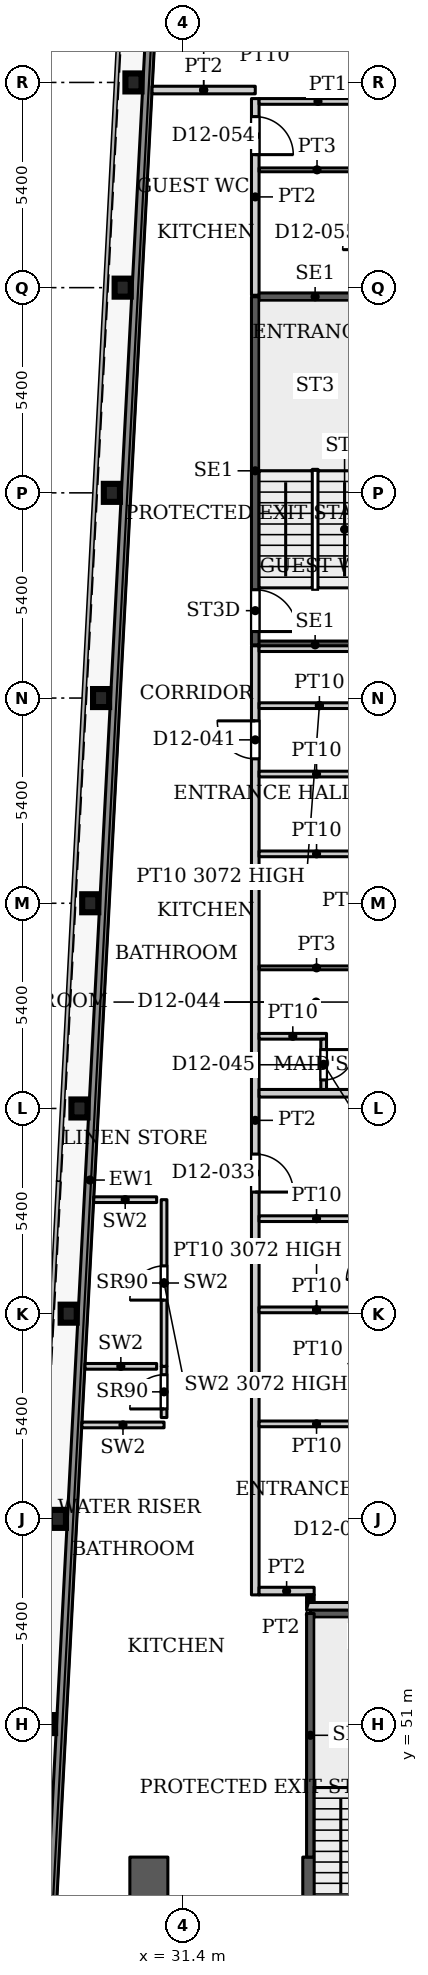
"""IFC4 building model, lengths in metres.
Left out: names, types, materials, properties, quantities, classifications, styles, units other than length and angle.
Written with IfcOpenShell. Run it as: python <this file> out.ifc"""

import sys

from ifc_helpers import new_model, si_unit, direction, frame, frame_2d, origin, origin_2d, place, context, subcontext, project, spatial, rectangle, i_section, extrude, source, transform, mapped, element, fill, save


model = new_model("IFC4")
c1 = context("Model", 3, precision=1e-05, world=origin(), true_north=direction((0.0, 1.0)))
c2 = subcontext(c1, "Body", "Model", "MODEL_VIEW")
j1 = project(units=[si_unit("LENGTHUNIT", "METRE"), si_unit("PLANEANGLEUNIT", "RADIAN")], contexts=[c1])
p1 = place(None, origin())
s1 = spatial("IfcSite", under=j1, at=p1, CompositionType="ELEMENT")
p2 = place(p1, origin())
s2 = spatial("IfcBuilding", under=s1, at=p2, CompositionType="ELEMENT")
p3 = place(p2, frame((0.0, 0.0, 53.9)))
s3 = spatial("IfcBuildingStorey", under=s2, at=p3, CompositionType="ELEMENT", Elevation=53.9)
for number, where, z_axis, x_axis in (
    (1, (27.822, 51.0, 0.0), (0.0, 0.0, 1.0), (1.0, 0.0, 0.0)),
    (2, (28.106, 56.4, 0.0), (0.0, 0.0, 1.0), (1.0, 0.0, 0.0)),
    (3, (28.39, 61.8, 0.0), (0.0, 0.0, 1.0), (1.0, 0.0, 0.0)),
    (4, (28.674, 67.2, 0.0), (0.0, 0.0, 1.0), (1.0, 0.0, 0.0)),
    (5, (28.958, 72.6, 0.0), (0.0, 0.0, 1.0), (1.0, 0.0, 0.0)),
    (6, (29.243, 78.0, 0.0), (0.0, 0.0, 1.0), (1.0, 0.0, 0.0)),
    (7, (29.527, 83.4, 0.0), (0.0, 0.0, 1.0), (1.0, 0.0, 0.0)),
    (8, (29.811, 88.8, 0.0), (0.0, 0.0, 1.0), (1.0, 0.0, 0.0)),
    (9, (30.095, 94.2, 0.0), (0.0, 0.0, 1.0), (1.0, 0.0, 0.0)),
):
    element("IfcColumn", number, at=place(p3, frame(where, z_axis=z_axis, x_axis=x_axis)), inside=s3, PredefinedType="COLUMN", context=c2, shape_type="SweptSolid", body=[
        extrude(i_section(OverallWidth=0.424, OverallDepth=0.474, WebThickness=0.048, FlangeThickness=0.077, FilletRadius=0.014, at=origin_2d()), origin(), (0.0, 0.0, 1.0), 3.9),
    ])
p4 = place(p3, frame((34.75, 29.05, 0.0), z_axis=(0.0, 0.0, 1.0), x_axis=(0.0, 1.0, 0.0)))
e10 = element("IfcWall", 10, at=p4, inside=s3, PredefinedType="SHEAR", context=c2, shape_type="SweptSolid", body=[
    extrude(rectangle(XDim=18.45, YDim=0.4, at=frame_2d((9.225, 0.0))), origin(), (0.0, 0.0, 1.0), 3.9),
])
p5 = place(p4, frame((8.025, 0.0, 0.0)))
e11 = element("IfcOpeningElement", 11, at=p5, cuts=e10, PredefinedType="OPENING", context=c2, shape_type="SweptSolid", body=[
    extrude(rectangle(XDim=1.1, YDim=2.2, at=frame_2d((0.55, 1.1))), frame((0.0, 0.21, 0.0), z_axis=(0.0, -1.0, 0.0), x_axis=(1.0, 0.0, 0.0)), (0.0, 0.0, 1.0), 0.42),
])
p6 = place(p4, frame((10.875, 0.0, 0.0)))
e12 = element("IfcOpeningElement", 12, at=p6, cuts=e10, PredefinedType="OPENING", context=c2, shape_type="SweptSolid", body=[
    extrude(rectangle(XDim=1.1, YDim=2.2, at=frame_2d((0.55, 1.1))), frame((0.0, 0.21, 0.0), z_axis=(0.0, -1.0, 0.0), x_axis=(1.0, 0.0, 0.0)), (0.0, 0.0, 1.0), 0.42),
])
p7 = place(p4, frame((13.725, 0.0, 0.0)))
e13 = element("IfcOpeningElement", 13, at=p7, cuts=e10, PredefinedType="OPENING", context=c2, shape_type="SweptSolid", body=[
    extrude(rectangle(XDim=1.1, YDim=2.2, at=frame_2d((0.55, 1.1))), frame((0.0, 0.21, 0.0), z_axis=(0.0, -1.0, 0.0), x_axis=(1.0, 0.0, 0.0)), (0.0, 0.0, 1.0), 0.42),
])
p8 = place(p4, frame((15.95, 0.0, 0.0)))
e14 = element("IfcOpeningElement", 14, at=p8, cuts=e10, PredefinedType="OPENING", context=c2, shape_type="SweptSolid", body=[
    extrude(rectangle(XDim=1.1, YDim=2.2, at=frame_2d((0.55, 1.1))), frame((0.0, 0.21, 0.0), z_axis=(0.0, -1.0, 0.0), x_axis=(1.0, 0.0, 0.0)), (0.0, 0.0, 1.0), 0.42),
])
p9 = place(p3, frame((30.5, 29.05, 0.0), z_axis=(0.0, 0.0, 1.0), x_axis=(0.0, 1.0, 0.0)))
e15 = element("IfcWall", 15, at=p9, inside=s3, PredefinedType="SHEAR", context=c2, shape_type="SweptSolid", body=[
    extrude(rectangle(XDim=18.45, YDim=1.0, at=frame_2d((9.225, 0.0))), origin(), (0.0, 0.0, 1.0), 3.9),
])
p10 = place(p9, frame((1.5, 0.0, 0.0)))
e16 = element("IfcOpeningElement", 16, at=p10, cuts=e15, PredefinedType="OPENING", context=c2, shape_type="SweptSolid", body=[
    extrude(rectangle(XDim=0.9, YDim=2.2, at=frame_2d((0.45, 1.1))), frame((0.0, 0.51, 0.0), z_axis=(0.0, -1.0, 0.0), x_axis=(1.0, 0.0, 0.0)), (0.0, 0.0, 1.0), 1.02),
])
p11 = place(p9, frame((6.03, 0.0, 0.0)))
e17 = element("IfcOpeningElement", 17, at=p11, cuts=e15, PredefinedType="OPENING", context=c2, shape_type="SweptSolid", body=[
    extrude(rectangle(XDim=0.9, YDim=2.2, at=frame_2d((0.45, 1.1))), frame((0.0, 0.51, 0.0), z_axis=(0.0, -1.0, 0.0), x_axis=(1.0, 0.0, 0.0)), (0.0, 0.0, 1.0), 1.02),
])
p12 = place(p9, frame((9.7, 0.0, 0.0)))
e18 = element("IfcOpeningElement", 18, at=p12, cuts=e15, PredefinedType="OPENING", context=c2, shape_type="SweptSolid", body=[
    extrude(rectangle(XDim=0.9, YDim=2.2, at=frame_2d((0.45, 1.1))), frame((0.0, 0.51, 0.0), z_axis=(0.0, -1.0, 0.0), x_axis=(1.0, 0.0, 0.0)), (0.0, 0.0, 1.0), 1.02),
])
p13 = place(p3, frame((27.195, 31.969, 0.0), z_axis=(0.0, 0.0, 1.0), x_axis=(0.052554995867, 0.998618031286, 0.0)))
e19 = element("IfcWall", 19, at=p13, inside=s3, PredefinedType="SOLIDWALL", context=c2, shape_type="SweptSolid", body=[
    extrude(rectangle(XDim=66.787, YDim=0.25, at=frame_2d((33.394, 0.0))), origin(), (0.0, 0.0, 1.0), 3.75),
])
p14 = place(p3, frame((34.75, 53.91, 0.0), z_axis=(0.0, 0.0, 1.0), x_axis=(1.0, 0.0, 0.0)))
e20 = element("IfcWall", 20, at=p14, inside=s3, PredefinedType="SHEAR", context=c2, shape_type="SweptSolid", body=[
    extrude(rectangle(XDim=3.15, YDim=0.2, at=frame_2d((1.575, 0.0))), origin(), (0.0, 0.0, 1.0), 3.9),
])
p15 = place(p3, frame((34.75, 47.5, 0.0), z_axis=(0.0, 0.0, 1.0), x_axis=(0.0, 1.0, 0.0)))
e21 = element("IfcWall", 21, at=p15, inside=s3, PredefinedType="SHEAR", context=c2, shape_type="SweptSolid", body=[
    extrude(rectangle(XDim=6.41, YDim=0.2, at=frame_2d((3.205, 0.0))), origin(), (0.0, 0.0, 1.0), 3.9),
])
for number, where, z_axis, x_axis in (
    (22, (33.3, 79.4, 0.0), (0.0, 0.0, 1.0), (1.0, 0.0, 0.0)),
    (23, (33.3, 88.56, 0.0), (0.0, 0.0, 1.0), (1.0, 0.0, 0.0)),
):
    element("IfcWall", number, at=place(p3, frame(where, z_axis=z_axis, x_axis=x_axis)), inside=s3, PredefinedType="SHEAR", context=c2, shape_type="SweptSolid", body=[
        extrude(rectangle(XDim=3.15, YDim=0.2, at=frame_2d((1.575, 0.0))), origin(), (0.0, 0.0, 1.0), 3.9),
    ])
p16 = place(p3, frame((33.3, 79.4, 0.0), z_axis=(0.0, 0.0, 1.0), x_axis=(0.0, 1.0, 0.0)))
e24 = element("IfcWall", 24, at=p16, inside=s3, PredefinedType="SHEAR", context=c2, shape_type="SweptSolid", body=[
    extrude(rectangle(XDim=9.16, YDim=0.2, at=frame_2d((4.58, 0.0))), origin(), (0.0, 0.0, 1.0), 3.9),
])
p17 = place(p16, frame((0.35, 0.0, 0.0)))
e25 = element("IfcOpeningElement", 25, at=p17, cuts=e24, PredefinedType="OPENING", context=c2, shape_type="SweptSolid", body=[
    extrude(rectangle(XDim=1.1, YDim=2.2, at=frame_2d((0.55, 1.1))), frame((0.0, 0.11, 0.0), z_axis=(0.0, -1.0, 0.0), x_axis=(1.0, 0.0, 0.0)), (0.0, 0.0, 1.0), 0.22),
])
p18 = place(p3, frame((28.738, 58.872, 0.0), z_axis=(0.0, 0.0, 1.0), x_axis=(1.0, 0.0, 0.0)))
e26 = element("IfcWall", 26, at=p18, inside=s3, PredefinedType="PARTITIONING", context=c2, shape_type="SweptSolid", body=[
    extrude(rectangle(XDim=2.162, YDim=0.15, at=frame_2d((1.081, 0.0))), origin(), (0.0, 0.0, 1.0), 3.9),
])
p19 = place(p3, frame((30.9, 59.067, 0.0), z_axis=(0.0, 0.0, 1.0), x_axis=(0.0, 1.0, 0.0)))
e27 = element("IfcWall", 27, at=p19, inside=s3, PredefinedType="PARTITIONING", context=c2, shape_type="SweptSolid", body=[
    extrude(rectangle(XDim=1.347, YDim=0.15, at=frame_2d((0.674, 0.0))), origin(), (0.0, 0.0, 1.0), 3.9),
])
p20 = place(p19, frame((0.226, 0.0, 0.0)))
e28 = element("IfcOpeningElement", 28, at=p20, cuts=e27, PredefinedType="OPENING", context=c2, shape_type="SweptSolid", body=[
    extrude(rectangle(XDim=0.9, YDim=2.2, at=frame_2d((0.45, 1.1))), frame((0.0, 0.085, 0.0), z_axis=(0.0, -1.0, 0.0), x_axis=(1.0, 0.0, 0.0)), (0.0, 0.0, 1.0), 0.17),
])
p21 = place(p3, frame((28.82, 60.414, 0.0), z_axis=(0.0, 0.0, 1.0), x_axis=(1.0, 0.0, 0.0)))
e29 = element("IfcWall", 29, at=p21, inside=s3, PredefinedType="PARTITIONING", context=c2, shape_type="SweptSolid", body=[
    extrude(rectangle(XDim=1.885, YDim=0.15, at=frame_2d((0.942, 0.0))), origin(), (0.0, 0.0, 1.0), 3.9),
])
p22 = place(p3, frame((30.9, 60.414, 0.0), z_axis=(0.0, 0.0, 1.0), x_axis=(0.0, 1.0, 0.0)))
e30 = element("IfcWall", 30, at=p22, inside=s3, PredefinedType="PARTITIONING", context=c2, shape_type="SweptSolid", body=[
    extrude(rectangle(XDim=4.386, YDim=0.15, at=frame_2d((2.193, 0.0))), origin(), (0.0, 0.0, 1.0), 3.072),
])
p23 = place(p22, frame((1.743, 0.0, 0.0)))
e31 = element("IfcOpeningElement", 31, at=p23, cuts=e30, PredefinedType="OPENING", context=c2, shape_type="SweptSolid", body=[
    extrude(rectangle(XDim=0.9, YDim=2.2, at=frame_2d((0.45, 1.1))), frame((0.0, 0.085, 0.0), z_axis=(0.0, -1.0, 0.0), x_axis=(1.0, 0.0, 0.0)), (0.0, 0.0, 1.0), 0.17),
])
p24 = place(p3, frame((29.05, 64.8, 0.0), z_axis=(0.0, 0.0, 1.0), x_axis=(1.0, 0.0, 0.0)))
e32 = element("IfcWall", 32, at=p24, inside=s3, PredefinedType="PARTITIONING", context=c2, shape_type="SweptSolid", body=[
    extrude(rectangle(XDim=1.655, YDim=0.15, at=frame_2d((0.828, 0.0))), origin(), (0.0, 0.0, 1.0), 3.9),
])
p25 = place(p3, frame((30.585, 94.0, 0.0), z_axis=(0.0, 0.0, 1.0), x_axis=(1.0, 0.0, 0.0)))
e33 = element("IfcWall", 33, at=p25, inside=s3, PredefinedType="PARTITIONING", context=c2, shape_type="SweptSolid", body=[
    extrude(rectangle(XDim=2.715, YDim=0.2, at=frame_2d((1.358, 0.0))), origin(), (0.0, 0.0, 1.0), 3.147),
])
p26 = place(p3, frame((33.3, 54.4, 0.0), z_axis=(0.0, 0.0, 1.0), x_axis=(0.0, 1.0, 0.0)))
e34 = element("IfcWall", 34, at=p26, inside=s3, PredefinedType="PARTITIONING", context=c2, shape_type="SweptSolid", body=[
    extrude(rectangle(XDim=24.975, YDim=0.2, at=frame_2d((12.488, 0.0))), origin(), (0.0, 0.0, 1.0), 3.6),
])
p27 = place(p26, frame((10.6, 0.0, 0.0)))
e35 = element("IfcOpeningElement", 35, at=p27, cuts=e34, PredefinedType="OPENING", context=c2, shape_type="SweptSolid", body=[
    extrude(rectangle(XDim=1.0, YDim=2.1, at=frame_2d((0.5, 1.05))), frame((0.0, 0.11, 0.0), z_axis=(0.0, -1.0, 0.0), x_axis=(1.0, 0.0, 0.0)), (0.0, 0.0, 1.0), 0.22),
])
p28 = place(p26, frame((22.0, 0.0, 0.0)))
e36 = element("IfcOpeningElement", 36, at=p28, cuts=e34, PredefinedType="OPENING", context=c2, shape_type="SweptSolid", body=[
    extrude(rectangle(XDim=1.0, YDim=2.1, at=frame_2d((0.5, 1.05))), frame((0.0, 0.11, 0.0), z_axis=(0.0, -1.0, 0.0), x_axis=(1.0, 0.0, 0.0)), (0.0, 0.0, 1.0), 0.22),
])
p29 = place(p3, frame((33.3, 88.6, 0.0), z_axis=(0.0, 0.0, 1.0), x_axis=(0.0, 1.0, 0.0)))
e37 = element("IfcWall", 37, at=p29, inside=s3, PredefinedType="PARTITIONING", context=c2, shape_type="SweptSolid", body=[
    extrude(rectangle(XDim=5.175, YDim=0.2, at=frame_2d((2.587, 0.0))), origin(), (0.0, 0.0, 1.0), 3.6),
])
p30 = place(p29, frame((3.7, 0.0, 0.0)))
e38 = element("IfcOpeningElement", 38, at=p30, cuts=e37, PredefinedType="OPENING", context=c2, shape_type="SweptSolid", body=[
    extrude(rectangle(XDim=1.0, YDim=2.1, at=frame_2d((0.5, 1.05))), frame((0.0, 0.11, 0.0), z_axis=(0.0, -1.0, 0.0), x_axis=(1.0, 0.0, 0.0)), (0.0, 0.0, 1.0), 0.22),
])
p31 = place(p3, frame((33.4, 54.5, 0.0), z_axis=(0.0, 0.0, 1.0), x_axis=(1.0, 0.0, 0.0)))
e39 = element("IfcWall", 39, at=p31, inside=s3, PredefinedType="PARTITIONING", context=c2, shape_type="SweptSolid", body=[
    extrude(rectangle(XDim=1.45, YDim=0.2, at=frame_2d((0.725, 0.0))), origin(), (0.0, 0.0, 1.0), 3.6),
])
p32 = place(p3, frame((33.4, 58.9, 0.0), z_axis=(0.0, 0.0, 1.0), x_axis=(1.0, 0.0, 0.0)))
e40 = element("IfcWall", 40, at=p32, inside=s3, PredefinedType="PARTITIONING", context=c2, shape_type="SweptSolid", body=[
    extrude(rectangle(XDim=3.025, YDim=0.15, at=frame_2d((1.513, 0.0))), origin(), (0.0, 0.0, 1.0), 3.6),
])
p33 = place(p3, frame((33.4, 61.9, 0.0), z_axis=(0.0, 0.0, 1.0), x_axis=(1.0, 0.0, 0.0)))
e41 = element("IfcWall", 41, at=p33, inside=s3, PredefinedType="PARTITIONING", context=c2, shape_type="SweptSolid", body=[
    extrude(rectangle(XDim=3.025, YDim=0.15, at=frame_2d((1.513, 0.0))), origin(), (0.0, 0.0, 1.0), 3.072),
])
p34 = place(p3, frame((33.4, 64.3, 0.0), z_axis=(0.0, 0.0, 1.0), x_axis=(1.0, 0.0, 0.0)))
e42 = element("IfcWall", 42, at=p34, inside=s3, PredefinedType="PARTITIONING", context=c2, shape_type="SweptSolid", body=[
    extrude(rectangle(XDim=3.025, YDim=0.15, at=frame_2d((1.513, 0.0))), origin(), (0.0, 0.0, 1.0), 3.6),
])
p35 = place(p3, frame((33.4, 67.6, 0.0), z_axis=(0.0, 0.0, 1.0), x_axis=(1.0, 0.0, 0.0)))
e43 = element("IfcWall", 43, at=p35, inside=s3, PredefinedType="PARTITIONING", context=c2, shape_type="SweptSolid", body=[
    extrude(rectangle(XDim=12.5, YDim=0.2, at=frame_2d((6.25, 0.0))), origin(), (0.0, 0.0, 1.0), 3.6),
])
p36 = place(p3, frame((33.4, 69.1, 0.0), z_axis=(0.0, 0.0, 1.0), x_axis=(1.0, 0.0, 0.0)))
e44 = element("IfcWall", 44, at=p36, inside=s3, PredefinedType="PARTITIONING", context=c2, shape_type="SweptSolid", body=[
    extrude(rectangle(XDim=1.775, YDim=0.15, at=frame_2d((0.888, 0.0))), origin(), (0.0, 0.0, 1.0), 3.6),
])
p37 = place(p3, frame((33.4, 70.9, 0.0), z_axis=(0.0, 0.0, 1.0), x_axis=(1.0, 0.0, 0.0)))
e45 = element("IfcWall", 45, at=p37, inside=s3, PredefinedType="PARTITIONING", context=c2, shape_type="SweptSolid", body=[
    extrude(rectangle(XDim=3.025, YDim=0.1, at=frame_2d((1.513, 0.0))), origin(), (0.0, 0.0, 1.0), 3.6),
])
for number, where, z_axis, x_axis in (
    (46, (33.4, 73.9, 0.0), (0.0, 0.0, 1.0), (1.0, 0.0, 0.0)),
    (47, (33.4, 76.0, 0.0), (0.0, 0.0, 1.0), (1.0, 0.0, 0.0)),
):
    element("IfcWall", number, at=place(p3, frame(where, z_axis=z_axis, x_axis=x_axis)), inside=s3, PredefinedType="PARTITIONING", context=c2, shape_type="SweptSolid", body=[
        extrude(rectangle(XDim=3.025, YDim=0.15, at=frame_2d((1.513, 0.0))), origin(), (0.0, 0.0, 1.0), 3.6),
    ])
p38 = place(p3, frame((33.4, 77.8, 0.0), z_axis=(0.0, 0.0, 1.0), x_axis=(1.0, 0.0, 0.0)))
e48 = element("IfcWall", 48, at=p38, inside=s3, PredefinedType="PARTITIONING", context=c2, shape_type="SweptSolid", body=[
    extrude(rectangle(XDim=3.175, YDim=0.15, at=frame_2d((1.587, 0.0))), origin(), (0.0, 0.0, 1.0), 3.072),
])
p39 = place(p3, frame((33.4, 79.3, 0.0), z_axis=(0.0, 0.0, 1.0), x_axis=(1.0, 0.0, 0.0)))
e49 = element("IfcWall", 49, at=p39, inside=s3, PredefinedType="PARTITIONING", context=c2, shape_type="SweptSolid", body=[
    extrude(rectangle(XDim=12.5, YDim=0.15, at=frame_2d((6.25, 0.0))), origin(), (0.0, 0.0, 1.0), 3.6),
])
p40 = place(p39, frame((3.35, 0.0, 0.0)))
e50 = element("IfcOpeningElement", 50, at=p40, cuts=e49, PredefinedType="OPENING", context=c2, shape_type="SweptSolid", body=[
    extrude(rectangle(XDim=0.9, YDim=2.1, at=frame_2d((0.45, 1.05))), frame((0.0, 0.085, 0.0), z_axis=(0.0, -1.0, 0.0), x_axis=(1.0, 0.0, 0.0)), (0.0, 0.0, 1.0), 0.17),
])
p41 = place(p3, frame((33.4, 91.9, 0.0), z_axis=(0.0, 0.0, 1.0), x_axis=(1.0, 0.0, 0.0)))
e51 = element("IfcWall", 51, at=p41, inside=s3, PredefinedType="PARTITIONING", context=c2, shape_type="SweptSolid", body=[
    extrude(rectangle(XDim=3.05, YDim=0.1, at=frame_2d((1.525, 0.0))), origin(), (0.0, 0.0, 1.0), 3.6),
])
p42 = place(p3, frame((33.4, 93.7, 0.0), z_axis=(0.0, 0.0, 1.0), x_axis=(1.0, 0.0, 0.0)))
e52 = element("IfcWall", 52, at=p42, inside=s3, PredefinedType="PARTITIONING", context=c2, shape_type="SweptSolid", body=[
    extrude(rectangle(XDim=3.1, YDim=0.15, at=frame_2d((1.55, 0.0))), origin(), (0.0, 0.0, 1.0), 3.6),
])
p43 = place(p3, frame((34.65, 54.1, 0.0), z_axis=(0.0, 0.0, 1.0), x_axis=(1.0, 0.0, 0.0)))
e53 = element("IfcWall", 53, at=p43, inside=s3, PredefinedType="PARTITIONING", context=c2, shape_type="SweptSolid", body=[
    extrude(rectangle(XDim=11.25, YDim=0.2, at=frame_2d((5.625, 0.0))), origin(), (0.0, 0.0, 1.0), 3.6),
])
p44 = place(p3, frame((34.75, 54.2, 0.0), z_axis=(0.0, 0.0, 1.0), x_axis=(0.0, 1.0, 0.0)))
e54 = element("IfcWall", 54, at=p44, inside=s3, PredefinedType="PARTITIONING", context=c2, shape_type="SweptSolid", body=[
    extrude(rectangle(XDim=0.2, YDim=0.2, at=frame_2d((0.1, 0.0))), origin(), (0.0, 0.0, 1.0), 3.6),
])
p45 = place(p3, frame((35.1, 67.7, 0.0), z_axis=(0.0, 0.0, 1.0), x_axis=(0.0, 1.0, 0.0)))
e55 = element("IfcWall", 55, at=p45, inside=s3, PredefinedType="PARTITIONING", context=c2, shape_type="SweptSolid", body=[
    extrude(rectangle(XDim=1.325, YDim=0.15, at=frame_2d((0.663, 0.0))), origin(), (0.0, 0.0, 1.0), 3.6),
])
p46 = place(p45, frame((0.25, 0.0, 0.0)))
e56 = element("IfcOpeningElement", 56, at=p46, cuts=e55, PredefinedType="OPENING", context=c2, shape_type="SweptSolid", body=[
    extrude(rectangle(XDim=0.8, YDim=2.1, at=frame_2d((0.4, 1.05))), frame((0.0, 0.085, 0.0), z_axis=(0.0, -1.0, 0.0), x_axis=(1.0, 0.0, 0.0)), (0.0, 0.0, 1.0), 0.17),
])
m1 = source(origin(), c2, "Body", "SweptSolid", [
    extrude(rectangle(XDim=0.9, YDim=2.2, at=frame_2d((0.45, 1.1))), frame((0.0, 0.025, 0.0), z_axis=(0.0, -1.0, 0.0), x_axis=(1.0, 0.0, 0.0)), (0.0, 0.0, 1.0), 0.05),
])
p47 = place(p20, origin())
e57 = element("IfcDoor", 57, at=p47, inside=s3, OperationType="SINGLE_SWING_LEFT", PredefinedType="DOOR", context=c2, shape_type="MappedRepresentation", body=[
    mapped(m1, transform((0.0, 0.0, 0.0), x_axis=(1.0, 0.0, 0.0), y_axis=(0.0, 1.0, 0.0), z_axis=(0.0, 0.0, 1.0), scale=1.0)),
])
fill(e28, e57)
p48 = place(p23, origin())
e58 = element("IfcDoor", 58, at=p48, inside=s3, OperationType="SINGLE_SWING_LEFT", PredefinedType="DOOR", context=c2, shape_type="MappedRepresentation", body=[
    mapped(m1, transform((0.0, 0.0, 0.0), x_axis=(1.0, 0.0, 0.0), y_axis=(0.0, 1.0, 0.0), z_axis=(0.0, 0.0, 1.0), scale=1.0)),
])
fill(e31, e58)
m2 = source(origin(), c2, "Body", "SweptSolid", [
    extrude(rectangle(XDim=1.1, YDim=2.2, at=frame_2d((0.55, 1.1))), frame((0.0, 0.025, 0.0), z_axis=(0.0, -1.0, 0.0), x_axis=(1.0, 0.0, 0.0)), (0.0, 0.0, 1.0), 0.05),
])
p49 = place(p17, origin())
e59 = element("IfcDoor", 59, at=p49, inside=s3, OperationType="SINGLE_SWING_RIGHT", PredefinedType="DOOR", context=c2, shape_type="MappedRepresentation", body=[
    mapped(m2, transform((0.0, 0.0, 0.0), x_axis=(1.0, 0.0, 0.0), y_axis=(0.0, 1.0, 0.0), z_axis=(0.0, 0.0, 1.0), scale=1.0)),
])
fill(e25, e59)
m3 = source(origin(), c2, "Body", "SweptSolid", [
    extrude(rectangle(XDim=1.0, YDim=2.1, at=frame_2d((0.5, 1.05))), frame((0.0, 0.025, 0.0), z_axis=(0.0, -1.0, 0.0), x_axis=(1.0, 0.0, 0.0)), (0.0, 0.0, 1.0), 0.05),
])
p50 = place(p27, origin())
e60 = element("IfcDoor", 60, at=p50, inside=s3, OperationType="SINGLE_SWING_RIGHT", PredefinedType="DOOR", context=c2, shape_type="MappedRepresentation", body=[
    mapped(m3, transform((0.0, 0.0, 0.0), x_axis=(1.0, 0.0, 0.0), y_axis=(0.0, 1.0, 0.0), z_axis=(0.0, 0.0, 1.0), scale=1.0)),
])
fill(e35, e60)
p51 = place(p28, origin())
e61 = element("IfcDoor", 61, at=p51, inside=s3, OperationType="SINGLE_SWING_LEFT", PredefinedType="DOOR", context=c2, shape_type="MappedRepresentation", body=[
    mapped(m3, transform((0.0, 0.0, 0.0), x_axis=(1.0, 0.0, 0.0), y_axis=(0.0, 1.0, 0.0), z_axis=(0.0, 0.0, 1.0), scale=1.0)),
])
fill(e36, e61)
m4 = source(origin(), c2, "Body", "SweptSolid", [
    extrude(rectangle(XDim=0.8, YDim=2.1, at=frame_2d((0.4, 1.05))), frame((0.0, 0.025, 0.0), z_axis=(0.0, -1.0, 0.0), x_axis=(1.0, 0.0, 0.0)), (0.0, 0.0, 1.0), 0.05),
])
p52 = place(p46, origin())
e62 = element("IfcDoor", 62, at=p52, inside=s3, OperationType="SINGLE_SWING_RIGHT", PredefinedType="DOOR", context=c2, shape_type="MappedRepresentation", body=[
    mapped(m4, transform((0.0, 0.0, 0.0), x_axis=(1.0, 0.0, 0.0), y_axis=(0.0, 1.0, 0.0), z_axis=(0.0, 0.0, 1.0), scale=1.0)),
])
fill(e56, e62)
p53 = place(p30, origin())
e63 = element("IfcDoor", 63, at=p53, inside=s3, OperationType="SINGLE_SWING_RIGHT", PredefinedType="DOOR", context=c2, shape_type="MappedRepresentation", body=[
    mapped(m3, transform((0.0, 0.0, 0.0), x_axis=(1.0, 0.0, 0.0), y_axis=(0.0, 1.0, 0.0), z_axis=(0.0, 0.0, 1.0), scale=1.0)),
])
fill(e38, e63)
save(model, sys.argv[1])
